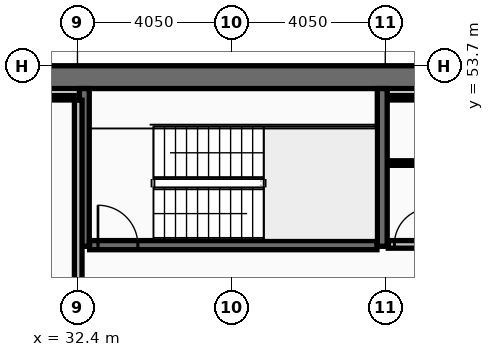
"""IFC4 building model, lengths in metres.
Left out: names, types, materials, properties, quantities, classifications, styles, units other than length and angle.
Written with IfcOpenShell. Run it as: python <this file> out.ifc"""

import sys

from ifc_helpers import new_model, si_unit, direction, frame, frame_2d, origin, place, context, subcontext, project, spatial, rectangle, extrude, element, fill, save


model = new_model("IFC4")
c1 = context("Model", 3, precision=1e-05, world=origin(), true_north=direction((0.0, 1.0)))
c2 = subcontext(c1, "Body", "Model", "MODEL_VIEW")
j1 = project(units=[si_unit("LENGTHUNIT", "METRE"), si_unit("PLANEANGLEUNIT", "RADIAN")], contexts=[c1])
p1 = place(None, origin())
s1 = spatial("IfcSite", under=j1, at=p1, CompositionType="ELEMENT")
p2 = place(p1, origin())
s2 = spatial("IfcBuilding", under=s1, at=p2, CompositionType="ELEMENT")
p3 = place(p2, frame((0.0, 0.0, 261.8)))
s3 = spatial("IfcBuildingStorey", under=s2, at=p3, CompositionType="ELEMENT", Elevation=261.8)
p4 = place(p3, frame((16.2, 53.4, 0.0), z_axis=(0.0, 0.0, 1.0), x_axis=(1.0, 0.0, 0.0)))
e1 = element("IfcWall", 1, at=p4, inside=s3, PredefinedType="SHEAR", context=c2, shape_type="SweptSolid", body=[
    extrude(rectangle(XDim=40.5, YDim=0.6, at=frame_2d((20.25, 0.0))), origin(), (0.0, 0.0, 1.0), 3.4),
])
for number, where, z_axis, x_axis in (
    (2, (32.58, 48.95, 0.0), (0.0, 0.0, 1.0), (0.0, 1.0, 0.0)),
    (3, (40.42, 48.95, 0.0), (0.0, 0.0, 1.0), (0.0, 1.0, 0.0)),
):
    element("IfcWall", number, at=place(p3, frame(where, z_axis=z_axis, x_axis=x_axis)), inside=s3, PredefinedType="SHEAR", context=c2, shape_type="SweptSolid", body=[
        extrude(rectangle(XDim=4.15, YDim=0.26, at=frame_2d((2.075, 0.0))), origin(), (0.0, 0.0, 1.0), 3.4),
    ])
p5 = place(p3, frame((32.72, 48.98, 0.0), z_axis=(0.0, 0.0, 1.0), x_axis=(1.0, 0.0, 0.0)))
e4 = element("IfcWall", 4, at=p5, inside=s3, PredefinedType="SHEAR", context=c2, shape_type="SweptSolid", body=[
    extrude(rectangle(XDim=7.56, YDim=0.24, at=frame_2d((3.78, 0.0))), origin(), (0.0, 0.0, 1.0), 3.4),
])
p6 = place(p5, frame((0.22, 0.0, 0.0)))
e5 = element("IfcOpeningElement", 5, at=p6, cuts=e4, PredefinedType="OPENING", context=c2, shape_type="SweptSolid", body=[
    extrude(rectangle(XDim=1.05, YDim=2.15, at=frame_2d((0.525, 1.075))), frame((0.0, 0.13, 0.0), z_axis=(0.0, -1.0, 0.0), x_axis=(1.0, 0.0, 0.0)), (0.0, 0.0, 1.0), 0.26),
])
p7 = place(p3, frame((32.42, 46.805, 0.0), z_axis=(0.0, 0.0, 1.0), x_axis=(0.0, 1.0, 0.0)))
e6 = element("IfcWall", 6, at=p7, inside=s3, PredefinedType="PARTITIONING", context=c2, shape_type="SweptSolid", body=[
    extrude(rectangle(XDim=5.99, YDim=0.2, at=frame_2d((2.995, 0.0))), origin(), (0.0, 0.0, 1.0), 3.4),
])
p8 = place(p3, frame((24.805, 52.86, 0.0), z_axis=(0.0, 0.0, 1.0), x_axis=(1.0, 0.0, 0.0)))
e7 = element("IfcWall", 7, at=p8, inside=s3, PredefinedType="PARTITIONING", context=c2, shape_type="SweptSolid", body=[
    extrude(rectangle(XDim=7.51, YDim=0.12, at=frame_2d((3.755, 0.0))), origin(), (0.0, 0.0, 1.0), 3.4),
])
p9 = place(p3, frame((40.58, 52.86, 0.0), z_axis=(0.0, 0.0, 1.0), x_axis=(1.0, 0.0, 0.0)))
e8 = element("IfcWall", 8, at=p9, inside=s3, PredefinedType="PARTITIONING", context=c2, shape_type="SweptSolid", body=[
    extrude(rectangle(XDim=7.56, YDim=0.12, at=frame_2d((3.78, 0.0))), origin(), (0.0, 0.0, 1.0), 3.4),
])
p10 = place(p3, frame((40.58, 49.0, 0.0), z_axis=(0.0, 0.0, 1.0), x_axis=(1.0, 0.0, 0.0)))
e9 = element("IfcWall", 9, at=p10, inside=s3, PredefinedType="PARTITIONING", context=c2, shape_type="SweptSolid", body=[
    extrude(rectangle(XDim=7.56, YDim=0.2, at=frame_2d((3.78, 0.0))), origin(), (0.0, 0.0, 1.0), 3.4),
])
p11 = place(p10, frame((0.16, 0.0, 0.0)))
e10 = element("IfcOpeningElement", 10, at=p11, cuts=e9, PredefinedType="OPENING", context=c2, shape_type="SweptSolid", body=[
    extrude(rectangle(XDim=0.95, YDim=2.1, at=frame_2d((0.475, 1.05))), frame((0.0, 0.11, 0.0), z_axis=(0.0, -1.0, 0.0), x_axis=(1.0, 0.0, 0.0)), (0.0, 0.0, 1.0), 0.22),
])
p12 = place(p3, frame((40.63, 51.14, 0.0), z_axis=(0.0, 0.0, 1.0), x_axis=(1.0, 0.0, 0.0)))
e11 = element("IfcWall", 11, at=p12, inside=s3, PredefinedType="PARTITIONING", context=c2, shape_type="SweptSolid", body=[
    extrude(rectangle(XDim=7.46, YDim=0.12, at=frame_2d((3.73, 0.0))), origin(), (0.0, 0.0, 1.0), 3.4),
])
p13 = place(p12, frame((2.4, 0.0, 0.0)))
e12 = element("IfcOpeningElement", 12, at=p13, cuts=e11, PredefinedType="OPENING", context=c2, shape_type="SweptSolid", body=[
    extrude(rectangle(XDim=0.9, YDim=2.05, at=frame_2d((0.45, 1.025))), frame((0.0, 0.07, 0.0), z_axis=(0.0, -1.0, 0.0), x_axis=(1.0, 0.0, 0.0)), (0.0, 0.0, 1.0), 0.14),
])
p14 = place(p6, origin())
e13 = element("IfcDoor", 13, at=p14, inside=s3, OperationType="SINGLE_SWING_LEFT", PredefinedType="DOOR", context=c2, shape_type="SweptSolid", body=[
    extrude(rectangle(XDim=1.05, YDim=2.15, at=frame_2d((0.525, 1.075))), frame((0.0, 0.025, 0.0), z_axis=(0.0, -1.0, 0.0), x_axis=(1.0, 0.0, 0.0)), (0.0, 0.0, 1.0), 0.05),
])
fill(e5, e13)
p15 = place(p11, origin())
e14 = element("IfcDoor", 14, at=p15, inside=s3, OperationType="SINGLE_SWING_RIGHT", PredefinedType="DOOR", context=c2, shape_type="SweptSolid", body=[
    extrude(rectangle(XDim=0.95, YDim=2.1, at=frame_2d((0.475, 1.05))), frame((0.0, 0.025, 0.0), z_axis=(0.0, -1.0, 0.0), x_axis=(1.0, 0.0, 0.0)), (0.0, 0.0, 1.0), 0.05),
])
fill(e10, e14)
save(model, sys.argv[1])
